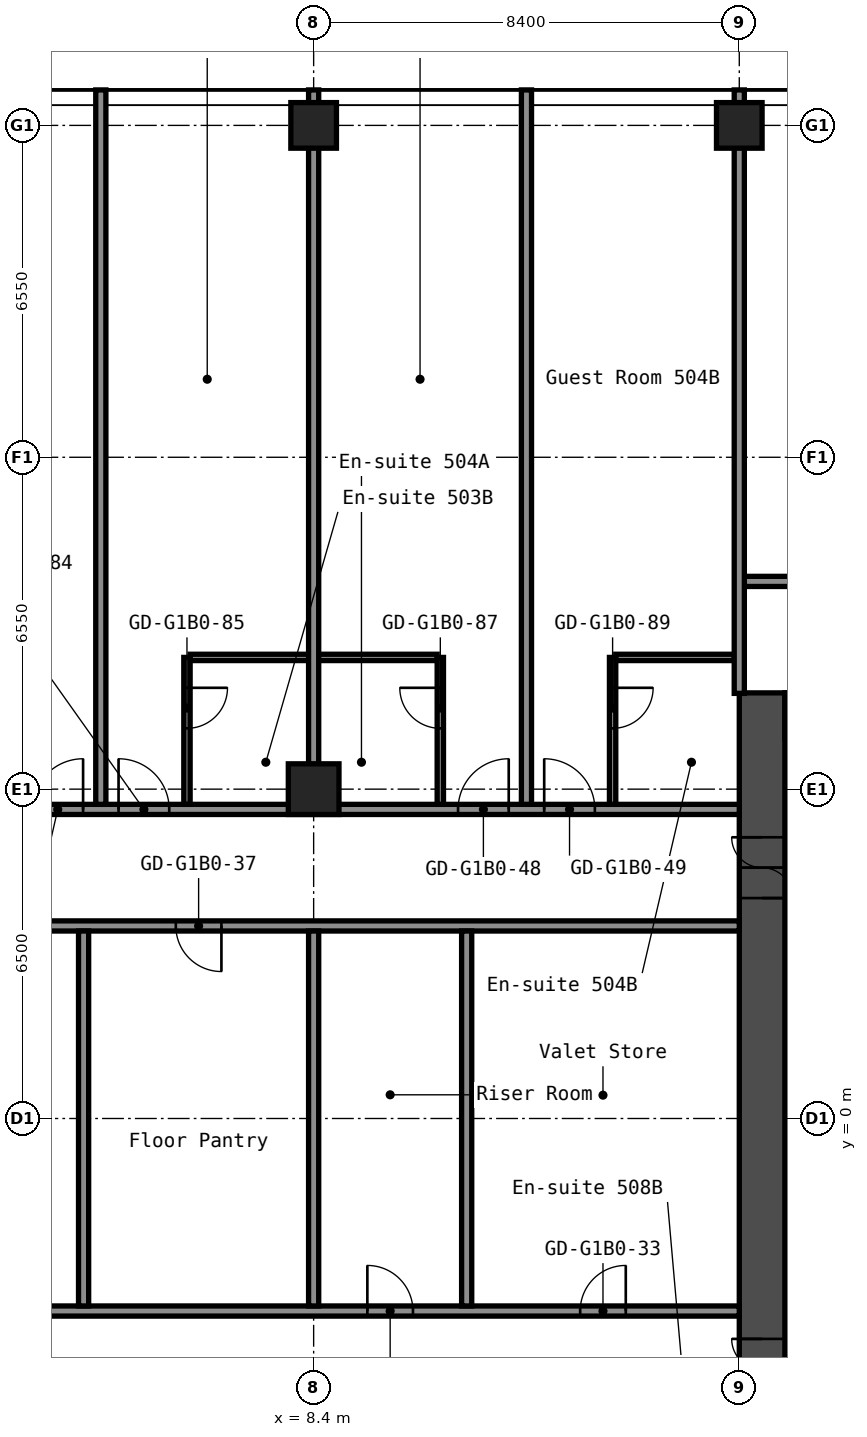
"""IFC4 building model, lengths in metres.
Left out: names, types, materials, properties, quantities, classifications, styles, units other than length and angle.
Written with IfcOpenShell. Run it as: python <this file> out.ifc"""

import sys

from ifc_helpers import new_model, si_unit, direction, frame, frame_2d, origin, origin_2d, place, context, subcontext, project, spatial, rectangle, hollow_rectangle, extrude, element, fill, save


model = new_model("IFC4")
c1 = context("Model", 3, precision=1e-05, world=origin(), true_north=direction((0.0, 1.0)))
c2 = subcontext(c1, "Body", "Model", "MODEL_VIEW")
j1 = project(units=[si_unit("LENGTHUNIT", "METRE"), si_unit("PLANEANGLEUNIT", "RADIAN")], contexts=[c1])
p1 = place(None, origin())
s1 = spatial("IfcSite", under=j1, at=p1, CompositionType="ELEMENT")
p2 = place(p1, origin())
s2 = spatial("IfcBuilding", under=s1, at=p2, CompositionType="ELEMENT")
p3 = place(p2, frame((0.0, 0.0, 23.0)))
s3 = spatial("IfcBuildingStorey", under=s2, at=p3, CompositionType="ELEMENT", Elevation=23.0)
p4 = place(p3, frame((8.4, 6.5, 0.0), z_axis=(0.0, 0.0, 1.0), x_axis=(1.0, 0.0, 0.0)))
e1 = element("IfcColumn", 1, at=p4, inside=s3, PredefinedType="COLUMN", context=c2, shape_type="SweptSolid", body=[
    extrude(hollow_rectangle(XDim=1.0, YDim=1.0, WallThickness=0.04, at=origin_2d()), origin(), (0.0, 0.0, 1.0), 2.8),
])
for number, where, z_axis, x_axis in (
    (2, (8.4, 19.6, 0.0), (0.0, 0.0, 1.0), (1.0, 0.0, 0.0)),
    (3, (16.8, 19.6, 0.0), (0.0, 0.0, 1.0), (1.0, 0.0, 0.0)),
):
    element("IfcColumn", number, at=place(p3, frame(where, z_axis=z_axis, x_axis=x_axis)), inside=s3, PredefinedType="COLUMN", context=c2, shape_type="SweptSolid", body=[
        extrude(hollow_rectangle(XDim=0.9, YDim=0.9, WallThickness=0.036, at=origin_2d()), origin(), (0.0, 0.0, 1.0), 2.8),
    ])
p5 = place(p3, frame((17.25, -8.4, 0.0), z_axis=(0.0, 0.0, 1.0), x_axis=(0.0, 1.0, 0.0)))
e4 = element("IfcWall", 4, at=p5, inside=s3, PredefinedType="SHEAR", context=c2, shape_type="SweptSolid", body=[
    extrude(rectangle(XDim=16.8, YDim=0.9, at=frame_2d((8.4, 0.0))), origin(), (0.0, 0.0, 1.0), 2.8),
])
p6 = place(p5, frame((12.75, 0.0, 0.0)))
e5 = element("IfcOpeningElement", 5, at=p6, cuts=e4, PredefinedType="OPENING", context=c2, shape_type="SweptSolid", body=[
    extrude(rectangle(XDim=1.2, YDim=2.1, at=frame_2d((0.6, 1.05))), frame((0.0, 0.46, 0.0), z_axis=(0.0, -1.0, 0.0), x_axis=(1.0, 0.0, 0.0)), (0.0, 0.0, 1.0), 0.92),
])
p7 = place(p5, frame((2.85, 0.0, 0.0)))
e6 = element("IfcOpeningElement", 6, at=p7, cuts=e4, PredefinedType="OPENING", context=c2, shape_type="SweptSolid", body=[
    extrude(rectangle(XDim=1.2, YDim=2.1, at=frame_2d((0.6, 1.05))), frame((0.0, 0.46, 0.0), z_axis=(0.0, -1.0, 0.0), x_axis=(1.0, 0.0, 0.0)), (0.0, 0.0, 1.0), 0.92),
])
p8 = place(p3, frame((17.7, 7.95, 0.0), z_axis=(0.0, 0.0, 1.0), x_axis=(1.0, 0.0, 0.0)))
e7 = element("IfcWall", 7, at=p8, inside=s3, PredefinedType="SHEAR", context=c2, shape_type="SweptSolid", body=[
    extrude(rectangle(XDim=15.0, YDim=0.9, at=frame_2d((7.5, 0.0))), origin(), (0.0, 0.0, 1.0), 2.8),
])
p9 = place(p8, frame((10.4, 0.0, 0.0)))
e8 = element("IfcOpeningElement", 8, at=p9, cuts=e7, PredefinedType="OPENING", context=c2, shape_type="SweptSolid", body=[
    extrude(rectangle(XDim=1.2, YDim=2.1, at=frame_2d((0.6, 1.05))), frame((0.0, 0.46, 0.0), z_axis=(0.0, -1.0, 0.0), x_axis=(1.0, 0.0, 0.0)), (0.0, 0.0, 1.0), 0.92),
])
p10 = place(p8, frame((13.35, 0.0, 0.0)))
e9 = element("IfcOpeningElement", 9, at=p10, cuts=e7, PredefinedType="OPENING", context=c2, shape_type="SweptSolid", body=[
    extrude(rectangle(XDim=0.9, YDim=2.1, at=frame_2d((0.45, 1.05))), frame((0.0, 0.46, 0.0), z_axis=(0.0, -1.0, 0.0), x_axis=(1.0, 0.0, 0.0)), (0.0, 0.0, 1.0), 0.92),
])
p11 = place(p3, frame((-16.8, -3.8, 0.0), z_axis=(0.0, 0.0, 1.0), x_axis=(1.0, 0.0, 0.0)))
e10 = element("IfcWall", 10, at=p11, inside=s3, PredefinedType="PARTITIONING", context=c2, shape_type="SweptSolid", body=[
    extrude(rectangle(XDim=33.6, YDim=0.2, at=frame_2d((16.8, 0.0))), origin(), (0.0, 0.0, 1.0), 2.8),
])
p12 = place(p11, frame((10.64, 0.0, 0.0)))
e11 = element("IfcOpeningElement", 11, at=p12, cuts=e10, PredefinedType="OPENING", context=c2, shape_type="SweptSolid", body=[
    extrude(rectangle(XDim=0.9, YDim=2.1, at=frame_2d((0.45, 1.05))), frame((0.0, 0.11, 0.0), z_axis=(0.0, -1.0, 0.0), x_axis=(1.0, 0.0, 0.0)), (0.0, 0.0, 1.0), 0.22),
])
p13 = place(p11, frame((14.84, 0.0, 0.0)))
e12 = element("IfcOpeningElement", 12, at=p13, cuts=e10, PredefinedType="OPENING", context=c2, shape_type="SweptSolid", body=[
    extrude(rectangle(XDim=0.9, YDim=2.1, at=frame_2d((0.45, 1.05))), frame((0.0, 0.11, 0.0), z_axis=(0.0, -1.0, 0.0), x_axis=(1.0, 0.0, 0.0)), (0.0, 0.0, 1.0), 0.22),
])
p14 = place(p11, frame((26.26, 0.0, 0.0)))
e13 = element("IfcOpeningElement", 13, at=p14, cuts=e10, PredefinedType="OPENING", context=c2, shape_type="SweptSolid", body=[
    extrude(rectangle(XDim=0.9, YDim=2.1, at=frame_2d((0.45, 1.05))), frame((0.0, 0.11, 0.0), z_axis=(0.0, -1.0, 0.0), x_axis=(1.0, 0.0, 0.0)), (0.0, 0.0, 1.0), 0.22),
])
p15 = place(p11, frame((30.46, 0.0, 0.0)))
e14 = element("IfcOpeningElement", 14, at=p15, cuts=e10, PredefinedType="OPENING", context=c2, shape_type="SweptSolid", body=[
    extrude(rectangle(XDim=0.9, YDim=2.1, at=frame_2d((0.45, 1.05))), frame((0.0, 0.11, 0.0), z_axis=(0.0, -1.0, 0.0), x_axis=(1.0, 0.0, 0.0)), (0.0, 0.0, 1.0), 0.22),
])
p16 = place(p3, frame((-16.8, 3.8, 0.0), z_axis=(0.0, 0.0, 1.0), x_axis=(1.0, 0.0, 0.0)))
e15 = element("IfcWall", 15, at=p16, inside=s3, PredefinedType="PARTITIONING", context=c2, shape_type="SweptSolid", body=[
    extrude(rectangle(XDim=33.6, YDim=0.2, at=frame_2d((16.8, 0.0))), origin(), (0.0, 0.0, 1.0), 2.8),
])
p17 = place(p16, frame((2.155, 0.0, 0.0)))
e16 = element("IfcOpeningElement", 16, at=p17, cuts=e15, PredefinedType="OPENING", context=c2, shape_type="SweptSolid", body=[
    extrude(rectangle(XDim=0.9, YDim=2.1, at=frame_2d((0.45, 1.05))), frame((0.0, 0.11, 0.0), z_axis=(0.0, -1.0, 0.0), x_axis=(1.0, 0.0, 0.0)), (0.0, 0.0, 1.0), 0.22),
])
p18 = place(p16, frame((6.355, 0.0, 0.0)))
e17 = element("IfcOpeningElement", 17, at=p18, cuts=e15, PredefinedType="OPENING", context=c2, shape_type="SweptSolid", body=[
    extrude(rectangle(XDim=0.9, YDim=2.1, at=frame_2d((0.45, 1.05))), frame((0.0, 0.11, 0.0), z_axis=(0.0, -1.0, 0.0), x_axis=(1.0, 0.0, 0.0)), (0.0, 0.0, 1.0), 0.22),
])
p19 = place(p16, frame((18.28, 0.0, 0.0)))
e18 = element("IfcOpeningElement", 18, at=p19, cuts=e15, PredefinedType="OPENING", context=c2, shape_type="SweptSolid", body=[
    extrude(rectangle(XDim=0.9, YDim=2.1, at=frame_2d((0.45, 1.05))), frame((0.0, 0.11, 0.0), z_axis=(0.0, -1.0, 0.0), x_axis=(1.0, 0.0, 0.0)), (0.0, 0.0, 1.0), 0.22),
])
p20 = place(p16, frame((22.48, 0.0, 0.0)))
e19 = element("IfcOpeningElement", 19, at=p20, cuts=e15, PredefinedType="OPENING", context=c2, shape_type="SweptSolid", body=[
    extrude(rectangle(XDim=0.9, YDim=2.1, at=frame_2d((0.45, 1.05))), frame((0.0, 0.11, 0.0), z_axis=(0.0, -1.0, 0.0), x_axis=(1.0, 0.0, 0.0)), (0.0, 0.0, 1.0), 0.22),
])
p21 = place(p3, frame((-16.8, 6.1, 0.0), z_axis=(0.0, 0.0, 1.0), x_axis=(1.0, 0.0, 0.0)))
e20 = element("IfcWall", 20, at=p21, inside=s3, PredefinedType="PARTITIONING", context=c2, shape_type="SweptSolid", body=[
    extrude(rectangle(XDim=33.6, YDim=0.2, at=frame_2d((16.8, 0.0))), origin(), (0.0, 0.0, 1.0), 2.8),
])
p22 = place(p21, frame((2.85, 0.0, 0.0)))
e21 = element("IfcOpeningElement", 21, at=p22, cuts=e20, PredefinedType="OPENING", context=c2, shape_type="SweptSolid", body=[
    extrude(rectangle(XDim=1.0, YDim=2.1, at=frame_2d((0.5, 1.05))), frame((0.0, 0.11, 0.0), z_axis=(0.0, -1.0, 0.0), x_axis=(1.0, 0.0, 0.0)), (0.0, 0.0, 1.0), 0.22),
])
p23 = place(p21, frame((4.55, 0.0, 0.0)))
e22 = element("IfcOpeningElement", 22, at=p23, cuts=e20, PredefinedType="OPENING", context=c2, shape_type="SweptSolid", body=[
    extrude(rectangle(XDim=1.0, YDim=2.1, at=frame_2d((0.5, 1.05))), frame((0.0, 0.11, 0.0), z_axis=(0.0, -1.0, 0.0), x_axis=(1.0, 0.0, 0.0)), (0.0, 0.0, 1.0), 0.22),
])
p24 = place(p21, frame((9.545, 0.0, 0.0)))
e23 = element("IfcOpeningElement", 23, at=p24, cuts=e20, PredefinedType="OPENING", context=c2, shape_type="SweptSolid", body=[
    extrude(rectangle(XDim=0.9, YDim=2.1, at=frame_2d((0.45, 1.05))), frame((0.0, 0.11, 0.0), z_axis=(0.0, -1.0, 0.0), x_axis=(1.0, 0.0, 0.0)), (0.0, 0.0, 1.0), 0.22),
])
p25 = place(p21, frame((13.745, 0.0, 0.0)))
e24 = element("IfcOpeningElement", 24, at=p25, cuts=e20, PredefinedType="OPENING", context=c2, shape_type="SweptSolid", body=[
    extrude(rectangle(XDim=0.9, YDim=2.1, at=frame_2d((0.45, 1.05))), frame((0.0, 0.11, 0.0), z_axis=(0.0, -1.0, 0.0), x_axis=(1.0, 0.0, 0.0)), (0.0, 0.0, 1.0), 0.22),
])
p26 = place(p21, frame((19.65, 0.0, 0.0)))
e25 = element("IfcOpeningElement", 25, at=p26, cuts=e20, PredefinedType="OPENING", context=c2, shape_type="SweptSolid", body=[
    extrude(rectangle(XDim=1.0, YDim=2.1, at=frame_2d((0.5, 1.05))), frame((0.0, 0.11, 0.0), z_axis=(0.0, -1.0, 0.0), x_axis=(1.0, 0.0, 0.0)), (0.0, 0.0, 1.0), 0.22),
])
p27 = place(p21, frame((21.35, 0.0, 0.0)))
e26 = element("IfcOpeningElement", 26, at=p27, cuts=e20, PredefinedType="OPENING", context=c2, shape_type="SweptSolid", body=[
    extrude(rectangle(XDim=1.0, YDim=2.1, at=frame_2d((0.5, 1.05))), frame((0.0, 0.11, 0.0), z_axis=(0.0, -1.0, 0.0), x_axis=(1.0, 0.0, 0.0)), (0.0, 0.0, 1.0), 0.22),
])
p28 = place(p21, frame((28.05, 0.0, 0.0)))
e27 = element("IfcOpeningElement", 27, at=p28, cuts=e20, PredefinedType="OPENING", context=c2, shape_type="SweptSolid", body=[
    extrude(rectangle(XDim=1.0, YDim=2.1, at=frame_2d((0.5, 1.05))), frame((0.0, 0.11, 0.0), z_axis=(0.0, -1.0, 0.0), x_axis=(1.0, 0.0, 0.0)), (0.0, 0.0, 1.0), 0.22),
])
p29 = place(p21, frame((29.75, 0.0, 0.0)))
e28 = element("IfcOpeningElement", 28, at=p29, cuts=e20, PredefinedType="OPENING", context=c2, shape_type="SweptSolid", body=[
    extrude(rectangle(XDim=1.0, YDim=2.1, at=frame_2d((0.5, 1.05))), frame((0.0, 0.11, 0.0), z_axis=(0.0, -1.0, 0.0), x_axis=(1.0, 0.0, 0.0)), (0.0, 0.0, 1.0), 0.22),
])
p30 = place(p3, frame((5.962, 9.1, 0.0), z_axis=(0.0, 0.0, 1.0), x_axis=(1.0, 0.0, 0.0)))
e29 = element("IfcWall", 29, at=p30, inside=s3, PredefinedType="PARTITIONING", context=c2, shape_type="SweptSolid", body=[
    extrude(rectangle(XDim=4.875, YDim=0.125, at=frame_2d((2.438, 0.0))), origin(), (0.0, 0.0, 1.0), 2.8),
])
p31 = place(p3, frame((14.363, 9.1, 0.0), z_axis=(0.0, 0.0, 1.0), x_axis=(1.0, 0.0, 0.0)))
e30 = element("IfcWall", 30, at=p31, inside=s3, PredefinedType="PARTITIONING", context=c2, shape_type="SweptSolid", body=[
    extrude(rectangle(XDim=2.337, YDim=0.125, at=frame_2d((1.169, 0.0))), origin(), (0.0, 0.0, 1.0), 2.8),
])
p32 = place(p3, frame((16.8, 10.6, 0.0), z_axis=(0.0, 0.0, 1.0), x_axis=(1.0, 0.0, 0.0)))
e31 = element("IfcWall", 31, at=p32, inside=s3, PredefinedType="PARTITIONING", context=c2, shape_type="SweptSolid", body=[
    extrude(rectangle(XDim=34.3, YDim=0.2, at=frame_2d((17.15, 0.0))), origin(), (0.0, 0.0, 1.0), 2.8),
])
p33 = place(p32, frame((3.4, 0.0, 0.0)))
e32 = element("IfcOpeningElement", 32, at=p33, cuts=e31, PredefinedType="OPENING", context=c2, shape_type="SweptSolid", body=[
    extrude(rectangle(XDim=1.6, YDim=2.1, at=frame_2d((0.8, 1.05))), frame((0.0, 0.11, 0.0), z_axis=(0.0, -1.0, 0.0), x_axis=(1.0, 0.0, 0.0)), (0.0, 0.0, 1.0), 0.22),
])
p34 = place(p32, frame((11.8, 0.0, 0.0)))
e33 = element("IfcOpeningElement", 33, at=p34, cuts=e31, PredefinedType="OPENING", context=c2, shape_type="SweptSolid", body=[
    extrude(rectangle(XDim=1.6, YDim=2.1, at=frame_2d((0.8, 1.05))), frame((0.0, 0.11, 0.0), z_axis=(0.0, -1.0, 0.0), x_axis=(1.0, 0.0, 0.0)), (0.0, 0.0, 1.0), 0.22),
])
p35 = place(p32, frame((20.2, 0.0, 0.0)))
e34 = element("IfcOpeningElement", 34, at=p35, cuts=e31, PredefinedType="OPENING", context=c2, shape_type="SweptSolid", body=[
    extrude(rectangle(XDim=1.6, YDim=2.1, at=frame_2d((0.8, 1.05))), frame((0.0, 0.11, 0.0), z_axis=(0.0, -1.0, 0.0), x_axis=(1.0, 0.0, 0.0)), (0.0, 0.0, 1.0), 0.22),
])
p36 = place(p32, frame((28.8, 0.0, 0.0)))
e35 = element("IfcOpeningElement", 35, at=p36, cuts=e31, PredefinedType="OPENING", context=c2, shape_type="SweptSolid", body=[
    extrude(rectangle(XDim=1.6, YDim=2.1, at=frame_2d((0.8, 1.05))), frame((0.0, 0.11, 0.0), z_axis=(0.0, -1.0, 0.0), x_axis=(1.0, 0.0, 0.0)), (0.0, 0.0, 1.0), 0.22),
])
p37 = place(p3, frame((3.86, -3.7, 0.0), z_axis=(0.0, 0.0, 1.0), x_axis=(0.0, 1.0, 0.0)))
e36 = element("IfcWall", 36, at=p37, inside=s3, PredefinedType="PARTITIONING", context=c2, shape_type="SweptSolid", body=[
    extrude(rectangle(XDim=7.4, YDim=0.2, at=frame_2d((3.7, 0.0))), origin(), (0.0, 0.0, 1.0), 2.8),
])
p38 = place(p3, frame((4.2, 6.2, 0.0), z_axis=(0.0, 0.0, 1.0), x_axis=(0.0, 1.0, 0.0)))
e37 = element("IfcWall", 37, at=p38, inside=s3, PredefinedType="PARTITIONING", context=c2, shape_type="SweptSolid", body=[
    extrude(rectangle(XDim=14.1, YDim=0.2, at=frame_2d((7.05, 0.0))), origin(), (0.0, 0.0, 1.0), 2.8),
])
p39 = place(p3, frame((5.9, 6.2, 0.0), z_axis=(0.0, 0.0, 1.0), x_axis=(0.0, 1.0, 0.0)))
e38 = element("IfcWall", 38, at=p39, inside=s3, PredefinedType="PARTITIONING", context=c2, shape_type="SweptSolid", body=[
    extrude(rectangle(XDim=2.9, YDim=0.125, at=frame_2d((1.45, 0.0))), origin(), (0.0, 0.0, 1.0), 2.8),
])
p40 = place(p39, frame((1.5, 0.0, 0.0)))
e39 = element("IfcOpeningElement", 39, at=p40, cuts=e38, PredefinedType="OPENING", context=c2, shape_type="SweptSolid", body=[
    extrude(rectangle(XDim=0.8, YDim=2.1, at=frame_2d((0.4, 1.05))), frame((0.0, 0.073, 0.0), z_axis=(0.0, -1.0, 0.0), x_axis=(1.0, 0.0, 0.0)), (0.0, 0.0, 1.0), 0.145),
])
p41 = place(p3, frame((8.4, -3.7, 0.0), z_axis=(0.0, 0.0, 1.0), x_axis=(0.0, 1.0, 0.0)))
e40 = element("IfcWall", 40, at=p41, inside=s3, PredefinedType="PARTITIONING", context=c2, shape_type="SweptSolid", body=[
    extrude(rectangle(XDim=7.4, YDim=0.2, at=frame_2d((3.7, 0.0))), origin(), (0.0, 0.0, 1.0), 2.8),
])
p42 = place(p3, frame((8.4, 6.99, 0.0), z_axis=(0.0, 0.0, 1.0), x_axis=(0.0, 1.0, 0.0)))
e41 = element("IfcWall", 41, at=p42, inside=s3, PredefinedType="PARTITIONING", context=c2, shape_type="SweptSolid", body=[
    extrude(rectangle(XDim=13.31, YDim=0.2, at=frame_2d((6.655, 0.0))), origin(), (0.0, 0.0, 1.0), 2.8),
])
p43 = place(p3, frame((10.9, 6.2, 0.0), z_axis=(0.0, 0.0, 1.0), x_axis=(0.0, 1.0, 0.0)))
e42 = element("IfcWall", 42, at=p43, inside=s3, PredefinedType="PARTITIONING", context=c2, shape_type="SweptSolid", body=[
    extrude(rectangle(XDim=2.9, YDim=0.125, at=frame_2d((1.45, 0.0))), origin(), (0.0, 0.0, 1.0), 2.8),
])
p44 = place(p43, frame((1.5, 0.0, 0.0)))
e43 = element("IfcOpeningElement", 43, at=p44, cuts=e42, PredefinedType="OPENING", context=c2, shape_type="SweptSolid", body=[
    extrude(rectangle(XDim=0.8, YDim=2.1, at=frame_2d((0.4, 1.05))), frame((0.0, 0.073, 0.0), z_axis=(0.0, -1.0, 0.0), x_axis=(1.0, 0.0, 0.0)), (0.0, 0.0, 1.0), 0.145),
])
p45 = place(p3, frame((11.42, -3.7, 0.0), z_axis=(0.0, 0.0, 1.0), x_axis=(0.0, 1.0, 0.0)))
e44 = element("IfcWall", 44, at=p45, inside=s3, PredefinedType="PARTITIONING", context=c2, shape_type="SweptSolid", body=[
    extrude(rectangle(XDim=7.4, YDim=0.2, at=frame_2d((3.7, 0.0))), origin(), (0.0, 0.0, 1.0), 2.8),
])
p46 = place(p3, frame((12.6, 6.2, 0.0), z_axis=(0.0, 0.0, 1.0), x_axis=(0.0, 1.0, 0.0)))
e45 = element("IfcWall", 45, at=p46, inside=s3, PredefinedType="PARTITIONING", context=c2, shape_type="SweptSolid", body=[
    extrude(rectangle(XDim=14.1, YDim=0.2, at=frame_2d((7.05, 0.0))), origin(), (0.0, 0.0, 1.0), 2.8),
])
p47 = place(p3, frame((14.3, 6.2, 0.0), z_axis=(0.0, 0.0, 1.0), x_axis=(0.0, 1.0, 0.0)))
e46 = element("IfcWall", 46, at=p47, inside=s3, PredefinedType="PARTITIONING", context=c2, shape_type="SweptSolid", body=[
    extrude(rectangle(XDim=2.9, YDim=0.125, at=frame_2d((1.45, 0.0))), origin(), (0.0, 0.0, 1.0), 2.8),
])
p48 = place(p47, frame((1.5, 0.0, 0.0)))
e47 = element("IfcOpeningElement", 47, at=p48, cuts=e46, PredefinedType="OPENING", context=c2, shape_type="SweptSolid", body=[
    extrude(rectangle(XDim=0.8, YDim=2.1, at=frame_2d((0.4, 1.05))), frame((0.0, 0.073, 0.0), z_axis=(0.0, -1.0, 0.0), x_axis=(1.0, 0.0, 0.0)), (0.0, 0.0, 1.0), 0.145),
])
p49 = place(p3, frame((16.8, 8.39, 0.0), z_axis=(0.0, 0.0, 1.0), x_axis=(0.0, 1.0, 0.0)))
e48 = element("IfcWall", 48, at=p49, inside=s3, PredefinedType="PARTITIONING", context=c2, shape_type="SweptSolid", body=[
    extrude(rectangle(XDim=11.91, YDim=0.2, at=frame_2d((5.955, 0.0))), origin(), (0.0, 0.0, 1.0), 2.8),
])
p50 = place(p6, origin())
e49 = element("IfcDoor", 49, at=p50, inside=s3, OperationType="DOUBLE_DOOR_SINGLE_SWING", PredefinedType="DOOR", context=c2, shape_type="SweptSolid", body=[
    extrude(rectangle(XDim=1.2, YDim=2.1, at=frame_2d((0.6, 1.05))), frame((0.0, 0.025, 0.0), z_axis=(0.0, -1.0, 0.0), x_axis=(1.0, 0.0, 0.0)), (0.0, 0.0, 1.0), 0.05),
])
fill(e5, e49)
p51 = place(p7, origin())
e50 = element("IfcDoor", 50, at=p51, inside=s3, OperationType="DOUBLE_DOOR_SINGLE_SWING", PredefinedType="DOOR", context=c2, shape_type="SweptSolid", body=[
    extrude(rectangle(XDim=1.2, YDim=2.1, at=frame_2d((0.6, 1.05))), frame((0.0, 0.025, 0.0), z_axis=(0.0, -1.0, 0.0), x_axis=(1.0, 0.0, 0.0)), (0.0, 0.0, 1.0), 0.05),
])
fill(e6, e50)
p52 = place(p14, origin())
e51 = element("IfcDoor", 51, at=p52, inside=s3, OperationType="SINGLE_SWING_RIGHT", PredefinedType="DOOR", context=c2, shape_type="SweptSolid", body=[
    extrude(rectangle(XDim=0.9, YDim=2.1, at=frame_2d((0.45, 1.05))), frame((0.0, 0.025, 0.0), z_axis=(0.0, -1.0, 0.0), x_axis=(1.0, 0.0, 0.0)), (0.0, 0.0, 1.0), 0.05),
])
fill(e13, e51)
p53 = place(p15, origin())
e52 = element("IfcDoor", 52, at=p53, inside=s3, OperationType="SINGLE_SWING_LEFT", PredefinedType="DOOR", context=c2, shape_type="SweptSolid", body=[
    extrude(rectangle(XDim=0.9, YDim=2.1, at=frame_2d((0.45, 1.05))), frame((0.0, 0.025, 0.0), z_axis=(0.0, -1.0, 0.0), x_axis=(1.0, 0.0, 0.0)), (0.0, 0.0, 1.0), 0.05),
])
fill(e14, e52)
p54 = place(p20, origin())
e53 = element("IfcDoor", 53, at=p54, inside=s3, OperationType="SINGLE_SWING_RIGHT", PredefinedType="DOOR", context=c2, shape_type="SweptSolid", body=[
    extrude(rectangle(XDim=0.9, YDim=2.1, at=frame_2d((0.45, 1.05))), frame((0.0, 0.025, 0.0), z_axis=(0.0, -1.0, 0.0), x_axis=(1.0, 0.0, 0.0)), (0.0, 0.0, 1.0), 0.05),
])
fill(e19, e53)
p55 = place(p26, origin())
e54 = element("IfcDoor", 54, at=p55, inside=s3, OperationType="SINGLE_SWING_LEFT", PredefinedType="DOOR", context=c2, shape_type="SweptSolid", body=[
    extrude(rectangle(XDim=1.0, YDim=2.1, at=frame_2d((0.5, 1.05))), frame((0.0, 0.025, 0.0), z_axis=(0.0, -1.0, 0.0), x_axis=(1.0, 0.0, 0.0)), (0.0, 0.0, 1.0), 0.05),
])
fill(e25, e54)
p56 = place(p27, origin())
e55 = element("IfcDoor", 55, at=p56, inside=s3, OperationType="SINGLE_SWING_RIGHT", PredefinedType="DOOR", context=c2, shape_type="SweptSolid", body=[
    extrude(rectangle(XDim=1.0, YDim=2.1, at=frame_2d((0.5, 1.05))), frame((0.0, 0.025, 0.0), z_axis=(0.0, -1.0, 0.0), x_axis=(1.0, 0.0, 0.0)), (0.0, 0.0, 1.0), 0.05),
])
fill(e26, e55)
p57 = place(p28, origin())
e56 = element("IfcDoor", 56, at=p57, inside=s3, OperationType="SINGLE_SWING_LEFT", PredefinedType="DOOR", context=c2, shape_type="SweptSolid", body=[
    extrude(rectangle(XDim=1.0, YDim=2.1, at=frame_2d((0.5, 1.05))), frame((0.0, 0.025, 0.0), z_axis=(0.0, -1.0, 0.0), x_axis=(1.0, 0.0, 0.0)), (0.0, 0.0, 1.0), 0.05),
])
fill(e27, e56)
p58 = place(p29, origin())
e57 = element("IfcDoor", 57, at=p58, inside=s3, OperationType="SINGLE_SWING_RIGHT", PredefinedType="DOOR", context=c2, shape_type="SweptSolid", body=[
    extrude(rectangle(XDim=1.0, YDim=2.1, at=frame_2d((0.5, 1.05))), frame((0.0, 0.025, 0.0), z_axis=(0.0, -1.0, 0.0), x_axis=(1.0, 0.0, 0.0)), (0.0, 0.0, 1.0), 0.05),
])
fill(e28, e57)
p59 = place(p40, origin())
e58 = element("IfcDoor", 58, at=p59, inside=s3, OperationType="SINGLE_SWING_RIGHT", PredefinedType="DOOR", context=c2, shape_type="SweptSolid", body=[
    extrude(rectangle(XDim=0.8, YDim=2.1, at=frame_2d((0.4, 1.05))), frame((0.0, 0.025, 0.0), z_axis=(0.0, -1.0, 0.0), x_axis=(1.0, 0.0, 0.0)), (0.0, 0.0, 1.0), 0.05),
])
fill(e39, e58)
p60 = place(p44, origin())
e59 = element("IfcDoor", 59, at=p60, inside=s3, OperationType="SINGLE_SWING_LEFT", PredefinedType="DOOR", context=c2, shape_type="SweptSolid", body=[
    extrude(rectangle(XDim=0.8, YDim=2.1, at=frame_2d((0.4, 1.05))), frame((0.0, 0.025, 0.0), z_axis=(0.0, -1.0, 0.0), x_axis=(1.0, 0.0, 0.0)), (0.0, 0.0, 1.0), 0.05),
])
fill(e43, e59)
p61 = place(p48, origin())
e60 = element("IfcDoor", 60, at=p61, inside=s3, OperationType="SINGLE_SWING_RIGHT", PredefinedType="DOOR", context=c2, shape_type="SweptSolid", body=[
    extrude(rectangle(XDim=0.8, YDim=2.1, at=frame_2d((0.4, 1.05))), frame((0.0, 0.025, 0.0), z_axis=(0.0, -1.0, 0.0), x_axis=(1.0, 0.0, 0.0)), (0.0, 0.0, 1.0), 0.05),
])
fill(e47, e60)
save(model, sys.argv[1])
